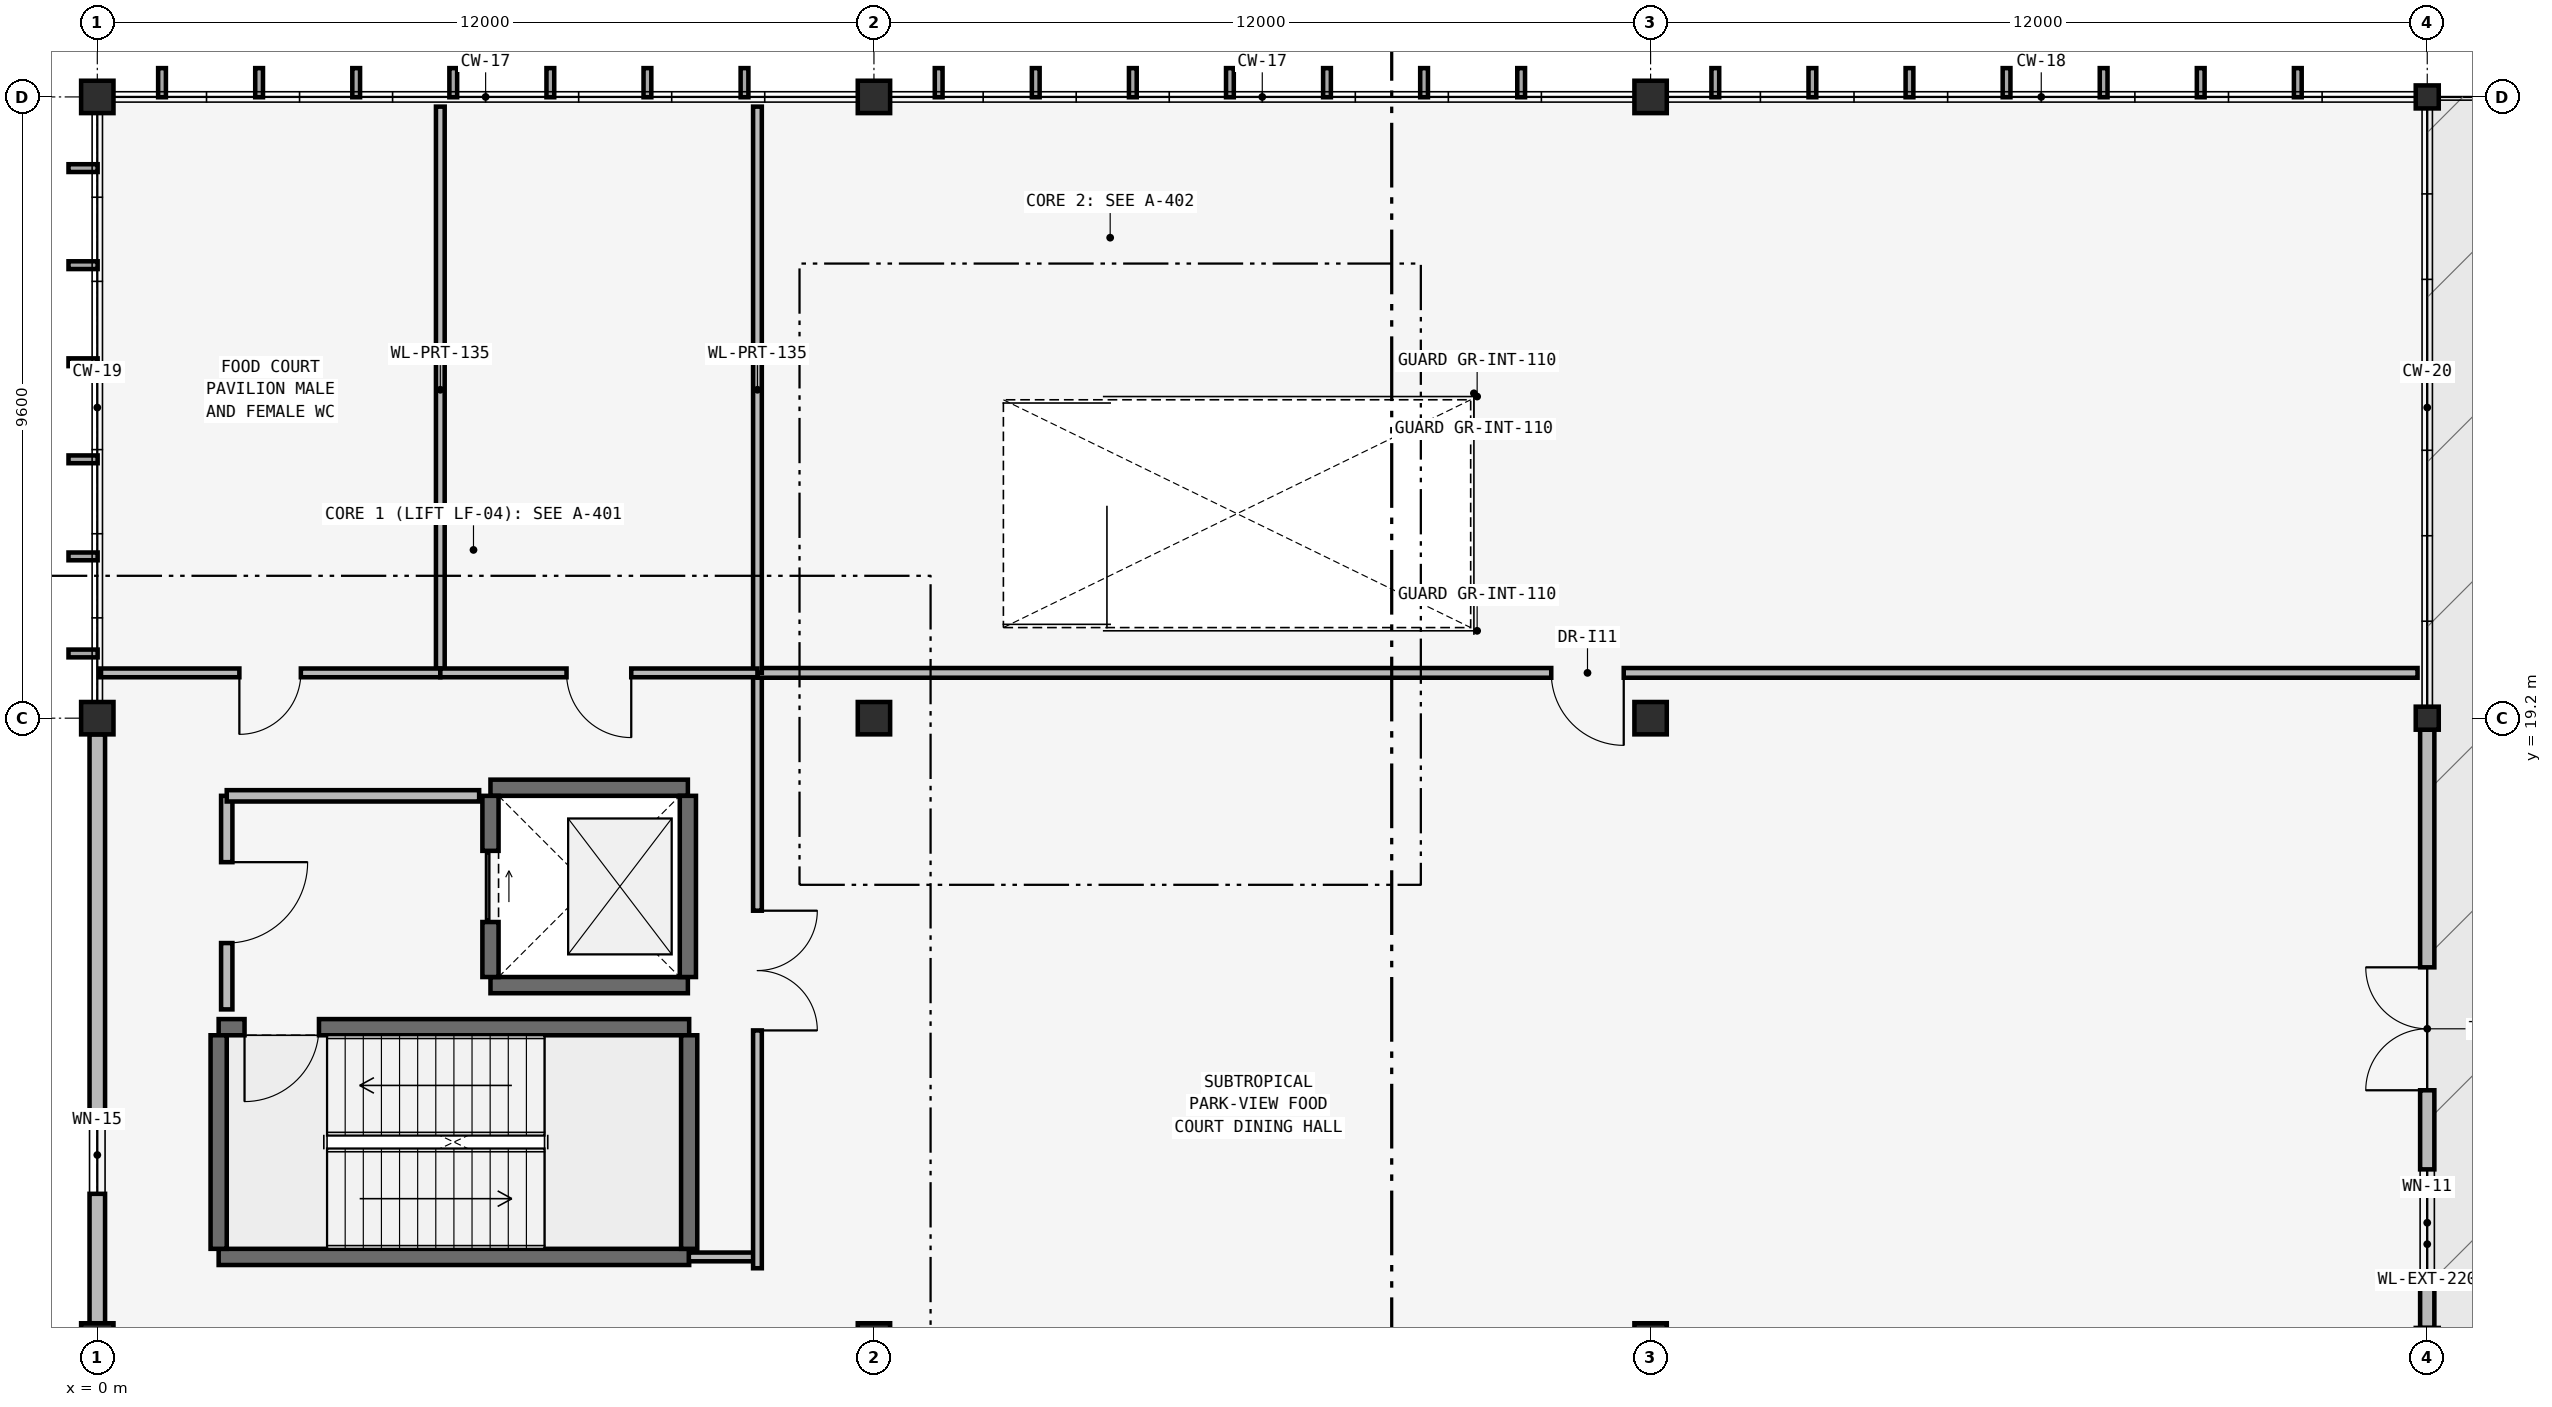
"""IFC4 building model, lengths in metres.
Left out: names, types, materials, properties, quantities, classifications, styles, units other than length and angle.
Written with IfcOpenShell. Run it as: python <this file> out.ifc"""

import sys

from ifc_helpers import new_model, si_unit, direction, frame, frame_2d, origin, origin_2d, place, context, subcontext, project, spatial, rectangle, hollow_circle, extrude, element, fill, save


model = new_model("IFC4")
c1 = context("Model", 3, precision=1e-05, world=origin(), true_north=direction((0.0, 1.0)))
c2 = subcontext(c1, "Body", "Model", "MODEL_VIEW")
j1 = project(units=[si_unit("LENGTHUNIT", "METRE"), si_unit("PLANEANGLEUNIT", "RADIAN")], contexts=[c1])
p1 = place(None, origin())
s1 = spatial("IfcSite", under=j1, at=p1, CompositionType="ELEMENT")
p2 = place(p1, origin())
s2 = spatial("IfcBuilding", under=s1, at=p2, CompositionType="ELEMENT")
p3 = place(p2, frame((0.0, 0.0, 5.4)))
s3 = spatial("IfcBuildingStorey", under=s2, at=p3, CompositionType="ELEMENT", Elevation=5.4)
for number, where, z_axis, x_axis in (
    (1, (0.0, 9.6, 0.0), (0.0, 0.0, 1.0), (1.0, 0.0, 0.0)),
    (2, (12.0, 9.6, 0.0), (0.0, 0.0, 1.0), (1.0, 0.0, 0.0)),
    (3, (24.0, 9.6, 0.0), (0.0, 0.0, 1.0), (1.0, 0.0, 0.0)),
    (4, (0.0, 19.2, 0.0), (0.0, 0.0, 1.0), (1.0, 0.0, 0.0)),
    (5, (12.0, 19.2, 0.0), (0.0, 0.0, 1.0), (1.0, 0.0, 0.0)),
    (6, (24.0, 19.2, 0.0), (0.0, 0.0, 1.0), (1.0, 0.0, 0.0)),
):
    element("IfcColumn", number, at=place(p3, frame(where, z_axis=z_axis, x_axis=x_axis)), inside=s3, PredefinedType="COLUMN", context=c2, shape_type="SweptSolid", body=[
        extrude(rectangle(XDim=0.5, YDim=0.5, at=origin_2d()), origin(), (0.0, 0.0, 1.0), 4.8),
    ])
p4 = place(p3, frame((36.0, 19.2, 0.0), z_axis=(0.0, 0.0, 1.0), x_axis=(1.0, 0.0, 0.0)))
e7 = element("IfcColumn", 7, at=p4, inside=s3, PredefinedType="COLUMN", context=c2, shape_type="SweptSolid", body=[
    extrude(hollow_circle(Radius=0.178, WallThickness=0.013, at=origin_2d()), origin(), (0.0, 0.0, 1.0), 4.8),
])
for number, where, z_axis, x_axis in (
    (8, (0.0, 28.8, 0.0), (0.0, 0.0, 1.0), (1.0, 0.0, 0.0)),
    (9, (12.0, 28.8, 0.0), (0.0, 0.0, 1.0), (1.0, 0.0, 0.0)),
    (10, (24.0, 28.8, 0.0), (0.0, 0.0, 1.0), (1.0, 0.0, 0.0)),
):
    element("IfcColumn", number, at=place(p3, frame(where, z_axis=z_axis, x_axis=x_axis)), inside=s3, PredefinedType="COLUMN", context=c2, shape_type="SweptSolid", body=[
        extrude(rectangle(XDim=0.5, YDim=0.5, at=origin_2d()), origin(), (0.0, 0.0, 1.0), 4.8),
    ])
p5 = place(p3, frame((36.0, 28.8, 0.0), z_axis=(0.0, 0.0, 1.0), x_axis=(1.0, 0.0, 0.0)))
e11 = element("IfcColumn", 11, at=p5, inside=s3, PredefinedType="COLUMN", context=c2, shape_type="SweptSolid", body=[
    extrude(hollow_circle(Radius=0.178, WallThickness=0.013, at=origin_2d()), origin(), (0.0, 0.0, 1.0), 4.8),
])
p6 = place(p3, frame((0.0, 9.85, 0.0), z_axis=(0.0, 0.0, 1.0), x_axis=(0.0, 1.0, 0.0)))
e12 = element("IfcWall", 12, at=p6, inside=s3, PredefinedType="SOLIDWALL", context=c2, shape_type="SweptSolid", body=[
    extrude(rectangle(XDim=9.1, YDim=0.24, at=frame_2d((4.55, 0.0))), origin(), (0.0, 0.0, 1.0), 3.881),
])
p7 = place(p6, frame((2.0, 0.0, 1.1)))
e13 = element("IfcOpeningElement", 13, at=p7, cuts=e12, PredefinedType="OPENING", context=c2, shape_type="SweptSolid", body=[
    extrude(rectangle(XDim=1.2, YDim=1.5, at=frame_2d((0.6, 0.75))), frame((0.0, 0.135, 0.0), z_axis=(0.0, -1.0, 0.0), x_axis=(1.0, 0.0, 0.0)), (0.0, 0.0, 1.0), 0.27),
])
p8 = place(p3, frame((36.0, 9.778, 0.0), z_axis=(0.0, 0.0, 1.0), x_axis=(0.0, 1.0, 0.0)))
e14 = element("IfcWall", 14, at=p8, inside=s3, PredefinedType="SOLIDWALL", context=c2, shape_type="SweptSolid", body=[
    extrude(rectangle(XDim=9.244, YDim=0.22, at=frame_2d((4.622, 0.0))), origin(), (0.0, 0.0, 1.0), 3.901),
])
p9 = place(p8, frame((3.672, 0.0, 0.0)))
e15 = element("IfcOpeningElement", 15, at=p9, cuts=e14, PredefinedType="OPENING", context=c2, shape_type="SweptSolid", body=[
    extrude(rectangle(XDim=1.9, YDim=2.25, at=frame_2d((0.95, 1.125))), frame((0.0, 0.125, 0.0), z_axis=(0.0, -1.0, 0.0), x_axis=(1.0, 0.0, 0.0)), (0.0, 0.0, 1.0), 0.25),
])
p10 = place(p8, frame((0.8, 0.0, 0.8)))
e16 = element("IfcOpeningElement", 16, at=p10, cuts=e14, PredefinedType="OPENING", context=c2, shape_type="SweptSolid", body=[
    extrude(rectangle(XDim=1.65, YDim=2.1, at=frame_2d((0.825, 1.05))), frame((0.0, 0.125, 0.0), z_axis=(0.0, -1.0, 0.0), x_axis=(1.0, 0.0, 0.0)), (0.0, 0.0, 1.0), 0.25),
])
p11 = place(p3, frame((1.875, 10.875, 0.0), z_axis=(0.0, 0.0, 1.0), x_axis=(1.0, 0.0, 0.0)))
e17 = element("IfcWall", 17, at=p11, inside=s3, PredefinedType="SHEAR", context=c2, shape_type="SweptSolid", body=[
    extrude(rectangle(XDim=7.27, YDim=0.25, at=frame_2d((3.635, 0.0))), origin(), (0.0, 0.0, 1.0), 4.52),
])
p12 = place(p3, frame((1.875, 14.425, 0.0), z_axis=(0.0, 0.0, 1.0), x_axis=(1.0, 0.0, 0.0)))
e18 = element("IfcWall", 18, at=p12, inside=s3, PredefinedType="SHEAR", context=c2, shape_type="SweptSolid", body=[
    extrude(rectangle(XDim=7.27, YDim=0.25, at=frame_2d((3.635, 0.0))), origin(), (0.0, 0.0, 1.0), 4.52),
])
p13 = place(p12, frame((0.4, 0.0, 0.0)))
e19 = element("IfcOpeningElement", 19, at=p13, cuts=e18, PredefinedType="OPENING", context=c2, shape_type="SweptSolid", body=[
    extrude(rectangle(XDim=1.15, YDim=2.15, at=frame_2d((0.575, 1.075))), frame((0.0, 0.14, 0.0), z_axis=(0.0, -1.0, 0.0), x_axis=(1.0, 0.0, 0.0)), (0.0, 0.0, 1.0), 0.28),
])
for number, where, z_axis, x_axis in (
    (20, (1.875, 11.0, 0.0), (0.0, 0.0, 1.0), (0.0, 1.0, 0.0)),
    (21, (9.145, 11.0, 0.0), (0.0, 0.0, 1.0), (0.0, 1.0, 0.0)),
):
    element("IfcWall", number, at=place(p3, frame(where, z_axis=z_axis, x_axis=x_axis)), inside=s3, PredefinedType="SHEAR", context=c2, shape_type="SweptSolid", body=[
        extrude(rectangle(XDim=3.3, YDim=0.25, at=frame_2d((1.65, 0.0))), origin(), (0.0, 0.0, 1.0), 4.52),
    ])
for number, where, z_axis, x_axis in (
    (22, (6.075, 15.075, 0.0), (0.0, 0.0, 1.0), (1.0, 0.0, 0.0)),
    (23, (6.075, 18.125, 0.0), (0.0, 0.0, 1.0), (1.0, 0.0, 0.0)),
):
    element("IfcWall", number, at=place(p3, frame(where, z_axis=z_axis, x_axis=x_axis)), inside=s3, PredefinedType="SHEAR", context=c2, shape_type="SweptSolid", body=[
        extrude(rectangle(XDim=3.05, YDim=0.25, at=frame_2d((1.525, 0.0))), origin(), (0.0, 0.0, 1.0), 4.52),
    ])
p14 = place(p3, frame((9.125, 15.2, 0.0), z_axis=(0.0, 0.0, 1.0), x_axis=(0.0, 1.0, 0.0)))
e24 = element("IfcWall", 24, at=p14, inside=s3, PredefinedType="SHEAR", context=c2, shape_type="SweptSolid", body=[
    extrude(rectangle(XDim=2.8, YDim=0.25, at=frame_2d((1.4, 0.0))), origin(), (0.0, 0.0, 1.0), 4.52),
])
p15 = place(p3, frame((6.075, 15.2, 0.0), z_axis=(0.0, 0.0, 1.0), x_axis=(0.0, 1.0, 0.0)))
e25 = element("IfcWall", 25, at=p15, inside=s3, PredefinedType="SHEAR", context=c2, shape_type="SweptSolid", body=[
    extrude(rectangle(XDim=2.8, YDim=0.25, at=frame_2d((1.4, 0.0))), origin(), (0.0, 0.0, 1.0), 4.52),
])
p16 = place(p15, frame((0.85, 0.0, 0.0)))
e26 = element("IfcOpeningElement", 26, at=p16, cuts=e25, PredefinedType="OPENING", context=c2, shape_type="SweptSolid", body=[
    extrude(rectangle(XDim=1.1, YDim=2.15, at=frame_2d((0.55, 1.075))), frame((0.0, 0.14, 0.0), z_axis=(0.0, -1.0, 0.0), x_axis=(1.0, 0.0, 0.0)), (0.0, 0.0, 1.0), 0.28),
])
p17 = place(p3, frame((2.0, 14.7, 0.0), z_axis=(0.0, 0.0, 1.0), x_axis=(0.0, 1.0, 0.0)))
e27 = element("IfcWall", 27, at=p17, inside=s3, PredefinedType="PARTITIONING", context=c2, shape_type="SweptSolid", body=[
    extrude(rectangle(XDim=3.3, YDim=0.175, at=frame_2d((1.65, 0.0))), origin(), (0.0, 0.0, 1.0), 4.52),
])
p18 = place(p17, frame((1.025, 0.0, 0.0)))
e28 = element("IfcOpeningElement", 28, at=p18, cuts=e27, PredefinedType="OPENING", context=c2, shape_type="SweptSolid", body=[
    extrude(rectangle(XDim=1.25, YDim=2.2, at=frame_2d((0.625, 1.1))), frame((0.0, 0.103, 0.0), z_axis=(0.0, -1.0, 0.0), x_axis=(1.0, 0.0, 0.0)), (0.0, 0.0, 1.0), 0.205),
])
p19 = place(p3, frame((2.0, 18.0, 0.0), z_axis=(0.0, 0.0, 1.0), x_axis=(1.0, 0.0, 0.0)))
e29 = element("IfcWall", 29, at=p19, inside=s3, PredefinedType="PARTITIONING", context=c2, shape_type="SweptSolid", body=[
    extrude(rectangle(XDim=3.9, YDim=0.175, at=frame_2d((1.95, 0.0))), origin(), (0.0, 0.0, 1.0), 4.52),
])
p20 = place(p3, frame((9.14, 10.875, 0.0), z_axis=(0.0, 0.0, 1.0), x_axis=(1.0, 0.0, 0.0)))
e30 = element("IfcWall", 30, at=p20, inside=s3, PredefinedType="PARTITIONING", context=c2, shape_type="SweptSolid", body=[
    extrude(rectangle(XDim=1.06, YDim=0.135, at=frame_2d((0.53, 0.0))), origin(), (0.0, 0.0, 1.0), 4.52),
])
p21 = place(p3, frame((10.2, 10.7, 0.0), z_axis=(0.0, 0.0, 1.0), x_axis=(0.0, 1.0, 0.0)))
e31 = element("IfcWall", 31, at=p21, inside=s3, PredefinedType="PARTITIONING", context=c2, shape_type="SweptSolid", body=[
    extrude(rectangle(XDim=9.2, YDim=0.135, at=frame_2d((4.6, 0.0))), origin(), (0.0, 0.0, 1.0), 4.52),
])
p22 = place(p21, frame((3.675, 0.0, 0.0)))
e32 = element("IfcOpeningElement", 32, at=p22, cuts=e31, PredefinedType="OPENING", context=c2, shape_type="SweptSolid", body=[
    extrude(rectangle(XDim=1.85, YDim=2.2, at=frame_2d((0.925, 1.1))), frame((0.0, 0.083, 0.0), z_axis=(0.0, -1.0, 0.0), x_axis=(1.0, 0.0, 0.0)), (0.0, 0.0, 1.0), 0.165),
])
p23 = place(p3, frame((10.2, 19.9, 0.0), z_axis=(0.0, 0.0, 1.0), x_axis=(1.0, 0.0, 0.0)))
e33 = element("IfcWall", 33, at=p23, inside=s3, PredefinedType="PARTITIONING", context=c2, shape_type="SweptSolid", body=[
    extrude(rectangle(XDim=25.65, YDim=0.15, at=frame_2d((12.825, 0.0))), origin(), (0.0, 0.0, 1.0), 4.52),
])
p24 = place(p23, frame((12.265, 0.0, 0.0)))
e34 = element("IfcOpeningElement", 34, at=p24, cuts=e33, PredefinedType="OPENING", context=c2, shape_type="SweptSolid", body=[
    extrude(rectangle(XDim=1.12, YDim=2.18, at=frame_2d((0.56, 1.09))), frame((0.0, 0.09, 0.0), z_axis=(0.0, -1.0, 0.0), x_axis=(1.0, 0.0, 0.0)), (0.0, 0.0, 1.0), 0.18),
])
for number, where, z_axis, x_axis in (
    (35, (5.3, 19.9, 0.0), (0.0, 0.0, 1.0), (0.0, 1.0, 0.0)),
    (36, (10.2, 19.9, 0.0), (0.0, 0.0, 1.0), (0.0, 1.0, 0.0)),
):
    element("IfcWall", number, at=place(p3, frame(where, z_axis=z_axis, x_axis=x_axis)), inside=s3, PredefinedType="PARTITIONING", context=c2, shape_type="SweptSolid", body=[
        extrude(rectangle(XDim=8.75, YDim=0.135, at=frame_2d((4.375, 0.0))), origin(), (0.0, 0.0, 1.0), 4.52),
    ])
p25 = place(p3, frame((0.04, 19.9, 0.0), z_axis=(0.0, 0.0, 1.0), x_axis=(1.0, 0.0, 0.0)))
e37 = element("IfcWall", 37, at=p25, inside=s3, PredefinedType="PARTITIONING", context=c2, shape_type="SweptSolid", body=[
    extrude(rectangle(XDim=5.26, YDim=0.135, at=frame_2d((2.63, 0.0))), origin(), (0.0, 0.0, 1.0), 4.52),
])
p26 = place(p25, frame((2.155, 0.0, 0.0)))
e38 = element("IfcOpeningElement", 38, at=p26, cuts=e37, PredefinedType="OPENING", context=c2, shape_type="SweptSolid", body=[
    extrude(rectangle(XDim=0.95, YDim=2.1, at=frame_2d((0.475, 1.05))), frame((0.0, 0.083, 0.0), z_axis=(0.0, -1.0, 0.0), x_axis=(1.0, 0.0, 0.0)), (0.0, 0.0, 1.0), 0.165),
])
p27 = place(p3, frame((5.3, 19.9, 0.0), z_axis=(0.0, 0.0, 1.0), x_axis=(1.0, 0.0, 0.0)))
e39 = element("IfcWall", 39, at=p27, inside=s3, PredefinedType="PARTITIONING", context=c2, shape_type="SweptSolid", body=[
    extrude(rectangle(XDim=4.9, YDim=0.135, at=frame_2d((2.45, 0.0))), origin(), (0.0, 0.0, 1.0), 4.52),
])
p28 = place(p27, frame((1.95, 0.0, 0.0)))
e40 = element("IfcOpeningElement", 40, at=p28, cuts=e39, PredefinedType="OPENING", context=c2, shape_type="SweptSolid", body=[
    extrude(rectangle(XDim=1.0, YDim=2.1, at=frame_2d((0.5, 1.05))), frame((0.0, 0.083, 0.0), z_axis=(0.0, -1.0, 0.0), x_axis=(1.0, 0.0, 0.0)), (0.0, 0.0, 1.0), 0.165),
])
p29 = place(p7, origin())
e41 = element("IfcWindow", 41, at=p29, inside=s3, PartitioningType="SINGLE_PANEL", PredefinedType="WINDOW", context=c2, shape_type="SweptSolid", body=[
    extrude(rectangle(XDim=1.2, YDim=1.5, at=frame_2d((0.6, 0.75))), frame((0.0, 0.03, 0.0), z_axis=(0.0, -1.0, 0.0), x_axis=(1.0, 0.0, 0.0)), (0.0, 0.0, 1.0), 0.06),
])
fill(e13, e41)
p30 = place(p9, frame((1.9, 0.0, 0.0), z_axis=(0.0, 0.0, 1.0), x_axis=(-1.0, 0.0, 0.0)))
e42 = element("IfcDoor", 42, at=p30, inside=s3, OperationType="DOUBLE_DOOR_SINGLE_SWING", PredefinedType="DOOR", context=c2, shape_type="SweptSolid", body=[
    extrude(rectangle(XDim=1.9, YDim=2.25, at=frame_2d((0.95, 1.125))), frame((0.0, 0.025, 0.0), z_axis=(0.0, -1.0, 0.0), x_axis=(1.0, 0.0, 0.0)), (0.0, 0.0, 1.0), 0.05),
])
fill(e15, e42)
p31 = place(p10, origin())
e43 = element("IfcWindow", 43, at=p31, inside=s3, PartitioningType="SINGLE_PANEL", PredefinedType="WINDOW", context=c2, shape_type="SweptSolid", body=[
    extrude(rectangle(XDim=1.65, YDim=2.1, at=frame_2d((0.825, 1.05))), frame((0.0, 0.03, 0.0), z_axis=(0.0, -1.0, 0.0), x_axis=(1.0, 0.0, 0.0)), (0.0, 0.0, 1.0), 0.06),
])
fill(e16, e43)
p32 = place(p13, frame((1.15, 0.0, 0.0), z_axis=(0.0, 0.0, 1.0), x_axis=(-1.0, 0.0, 0.0)))
e44 = element("IfcDoor", 44, at=p32, inside=s3, OperationType="SINGLE_SWING_LEFT", PredefinedType="DOOR", context=c2, shape_type="SweptSolid", body=[
    extrude(rectangle(XDim=1.15, YDim=2.15, at=frame_2d((0.575, 1.075))), frame((0.0, 0.025, 0.0), z_axis=(0.0, -1.0, 0.0), x_axis=(1.0, 0.0, 0.0)), (0.0, 0.0, 1.0), 0.05),
])
fill(e19, e44)
p33 = place(p16, origin())
e45 = element("IfcDoor", 45, at=p33, inside=s3, OperationType="SLIDING_TO_LEFT", PredefinedType="DOOR", context=c2, shape_type="SweptSolid", body=[
    extrude(rectangle(XDim=1.1, YDim=2.15, at=frame_2d((0.55, 1.075))), frame((0.0, 0.025, 0.0), z_axis=(0.0, -1.0, 0.0), x_axis=(1.0, 0.0, 0.0)), (0.0, 0.0, 1.0), 0.05),
])
fill(e26, e45)
p34 = place(p18, frame((1.25, 0.0, 0.0), z_axis=(0.0, 0.0, 1.0), x_axis=(-1.0, 0.0, 0.0)))
e46 = element("IfcDoor", 46, at=p34, inside=s3, OperationType="SINGLE_SWING_RIGHT", PredefinedType="DOOR", context=c2, shape_type="SweptSolid", body=[
    extrude(rectangle(XDim=1.25, YDim=2.2, at=frame_2d((0.625, 1.1))), frame((0.0, 0.025, 0.0), z_axis=(0.0, -1.0, 0.0), x_axis=(1.0, 0.0, 0.0)), (0.0, 0.0, 1.0), 0.05),
])
fill(e28, e46)
p35 = place(p22, origin())
e47 = element("IfcDoor", 47, at=p35, inside=s3, OperationType="DOUBLE_DOOR_SINGLE_SWING", PredefinedType="DOOR", context=c2, shape_type="SweptSolid", body=[
    extrude(rectangle(XDim=1.85, YDim=2.2, at=frame_2d((0.925, 1.1))), frame((0.0, 0.025, 0.0), z_axis=(0.0, -1.0, 0.0), x_axis=(1.0, 0.0, 0.0)), (0.0, 0.0, 1.0), 0.05),
])
fill(e32, e47)
p36 = place(p24, origin())
e48 = element("IfcDoor", 48, at=p36, inside=s3, OperationType="SINGLE_SWING_RIGHT", PredefinedType="DOOR", context=c2, shape_type="SweptSolid", body=[
    extrude(rectangle(XDim=1.12, YDim=2.18, at=frame_2d((0.56, 1.09))), frame((0.0, 0.025, 0.0), z_axis=(0.0, -1.0, 0.0), x_axis=(1.0, 0.0, 0.0)), (0.0, 0.0, 1.0), 0.05),
])
fill(e34, e48)
p37 = place(p26, origin())
e49 = element("IfcDoor", 49, at=p37, inside=s3, OperationType="SINGLE_SWING_LEFT", PredefinedType="DOOR", context=c2, shape_type="SweptSolid", body=[
    extrude(rectangle(XDim=0.95, YDim=2.1, at=frame_2d((0.475, 1.05))), frame((0.0, 0.025, 0.0), z_axis=(0.0, -1.0, 0.0), x_axis=(1.0, 0.0, 0.0)), (0.0, 0.0, 1.0), 0.05),
])
fill(e38, e49)
p38 = place(p28, origin())
e50 = element("IfcDoor", 50, at=p38, inside=s3, OperationType="SINGLE_SWING_RIGHT", PredefinedType="DOOR", context=c2, shape_type="SweptSolid", body=[
    extrude(rectangle(XDim=1.0, YDim=2.1, at=frame_2d((0.5, 1.05))), frame((0.0, 0.025, 0.0), z_axis=(0.0, -1.0, 0.0), x_axis=(1.0, 0.0, 0.0)), (0.0, 0.0, 1.0), 0.05),
])
fill(e40, e50)
save(model, sys.argv[1])
